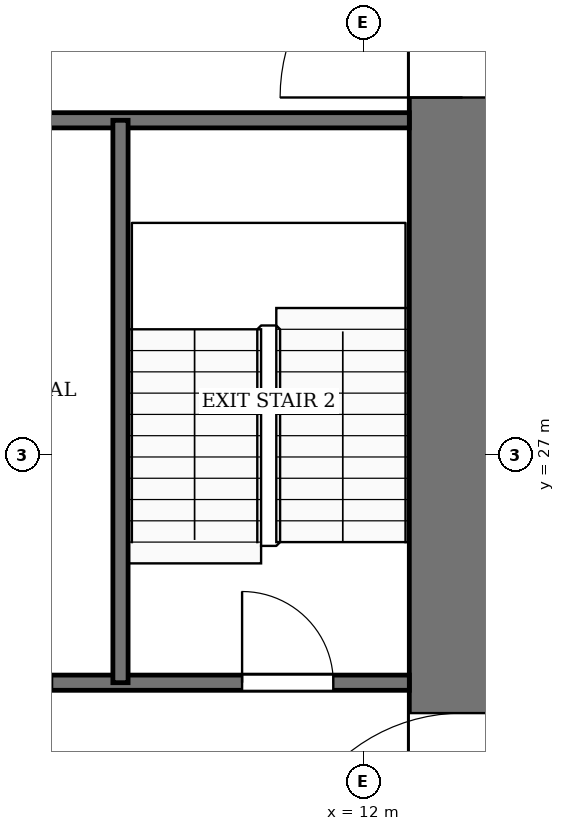
"""IFC4 building model, lengths in metres.
Left out: names, types, materials, properties, quantities, classifications, styles, units other than length and angle.
Written with IfcOpenShell. Run it as: python <this file> out.ifc"""

import sys

from ifc_helpers import new_model, si_unit, direction, frame, frame_2d, origin, place, context, subcontext, project, spatial, rectangle, extrude, element, fill, save


model = new_model("IFC4")
c1 = context("Model", 3, precision=1e-05, world=origin(), true_north=direction((0.0, 1.0)))
c2 = subcontext(c1, "Body", "Model", "MODEL_VIEW")
j1 = project(units=[si_unit("LENGTHUNIT", "METRE"), si_unit("PLANEANGLEUNIT", "RADIAN")], contexts=[c1])
p1 = place(None, origin())
s1 = spatial("IfcSite", under=j1, at=p1, CompositionType="ELEMENT")
p2 = place(p1, origin())
s2 = spatial("IfcBuilding", under=s1, at=p2, CompositionType="ELEMENT")
p3 = place(p2, frame((0.0, 0.0, 18.0)))
s3 = spatial("IfcBuildingStorey", under=s2, at=p3, CompositionType="ELEMENT", Elevation=18.0)
p4 = place(p3, frame((13.3, 18.4, -0.13), z_axis=(0.0, 0.0, 1.0), x_axis=(0.0, 1.0, 0.0)))
e1 = element("IfcWall", 1, at=p4, inside=s3, PredefinedType="SHEAR", context=c2, shape_type="SweptSolid", body=[
    extrude(rectangle(XDim=19.2, YDim=1.4, at=frame_2d((9.6, 0.0))), origin(), (0.0, 0.0, 1.0), 4.0),
])
p5 = place(p4, frame((2.8, 0.0, 0.13)))
e2 = element("IfcOpeningElement", 2, at=p5, cuts=e1, PredefinedType="OPENING", context=c2, shape_type="SweptSolid", body=[
    extrude(rectangle(XDim=2.4, YDim=2.4, at=frame_2d((1.2, 1.2))), frame((0.0, 0.71, 0.0), z_axis=(0.0, -1.0, 0.0), x_axis=(1.0, 0.0, 0.0)), (0.0, 0.0, 1.0), 1.42),
])
p6 = place(p4, frame((13.3, 0.0, 0.13)))
e3 = element("IfcOpeningElement", 3, at=p6, cuts=e1, PredefinedType="OPENING", context=c2, shape_type="SweptSolid", body=[
    extrude(rectangle(XDim=2.4, YDim=2.4, at=frame_2d((1.2, 1.2))), frame((0.0, 0.71, 0.0), z_axis=(0.0, -1.0, 0.0), x_axis=(1.0, 0.0, 0.0)), (0.0, 0.0, 1.0), 1.42),
])
p7 = place(p3, frame((6.0, 24.0, 0.0), z_axis=(0.0, 0.0, 1.0), x_axis=(1.0, 0.0, 0.0)))
e4 = element("IfcWall", 4, at=p7, inside=s3, PredefinedType="PARTITIONING", context=c2, shape_type="SweptSolid", body=[
    extrude(rectangle(XDim=6.6, YDim=0.2, at=frame_2d((3.3, 0.0))), origin(), (0.0, 0.0, 1.0), 3.87),
])
p8 = place(p7, frame((0.9, 0.0, 0.0)))
e5 = element("IfcOpeningElement", 5, at=p8, cuts=e4, PredefinedType="OPENING", context=c2, shape_type="SweptSolid", body=[
    extrude(rectangle(XDim=1.0, YDim=2.1, at=frame_2d((0.5, 1.05))), frame((0.0, 0.11, 0.0), z_axis=(0.0, -1.0, 0.0), x_axis=(1.0, 0.0, 0.0)), (0.0, 0.0, 1.0), 0.22),
])
p9 = place(p7, frame((4.4, 0.0, 0.0)))
e6 = element("IfcOpeningElement", 6, at=p9, cuts=e4, PredefinedType="OPENING", context=c2, shape_type="SweptSolid", body=[
    extrude(rectangle(XDim=1.2, YDim=2.2, at=frame_2d((0.6, 1.1))), frame((0.0, 0.11, 0.0), z_axis=(0.0, -1.0, 0.0), x_axis=(1.0, 0.0, 0.0)), (0.0, 0.0, 1.0), 0.22),
])
p10 = place(p3, frame((6.0, 31.4, 0.0), z_axis=(0.0, 0.0, 1.0), x_axis=(1.0, 0.0, 0.0)))
e7 = element("IfcWall", 7, at=p10, inside=s3, PredefinedType="PARTITIONING", context=c2, shape_type="SweptSolid", body=[
    extrude(rectangle(XDim=6.6, YDim=0.2, at=frame_2d((3.3, 0.0))), origin(), (0.0, 0.0, 1.0), 3.87),
])
p11 = place(p3, frame((8.8, 24.0, 0.0), z_axis=(0.0, 0.0, 1.0), x_axis=(0.0, 1.0, 0.0)))
e8 = element("IfcWall", 8, at=p11, inside=s3, PredefinedType="PARTITIONING", context=c2, shape_type="SweptSolid", body=[
    extrude(rectangle(XDim=7.4, YDim=0.2, at=frame_2d((3.7, 0.0))), origin(), (0.0, 0.0, 1.0), 3.87),
])
p12 = place(p9, origin())
e9 = element("IfcDoor", 9, at=p12, inside=s3, OperationType="SINGLE_SWING_LEFT", PredefinedType="DOOR", context=c2, shape_type="SweptSolid", body=[
    extrude(rectangle(XDim=1.2, YDim=2.2, at=frame_2d((0.6, 1.1))), frame((0.0, 0.025, 0.0), z_axis=(0.0, -1.0, 0.0), x_axis=(1.0, 0.0, 0.0)), (0.0, 0.0, 1.0), 0.05),
])
fill(e6, e9)
p13 = place(p5, origin())
e10 = element("IfcDoor", 10, at=p13, inside=s3, OperationType="DOUBLE_DOOR_SINGLE_SWING", PredefinedType="DOOR", context=c2, shape_type="SweptSolid", body=[
    extrude(rectangle(XDim=2.4, YDim=2.4, at=frame_2d((1.2, 1.2))), frame((0.0, 0.025, 0.0), z_axis=(0.0, -1.0, 0.0), x_axis=(1.0, 0.0, 0.0)), (0.0, 0.0, 1.0), 0.05),
])
fill(e2, e10)
p14 = place(p6, origin())
e11 = element("IfcDoor", 11, at=p14, inside=s3, OperationType="DOUBLE_DOOR_SINGLE_SWING", PredefinedType="DOOR", context=c2, shape_type="SweptSolid", body=[
    extrude(rectangle(XDim=2.4, YDim=2.4, at=frame_2d((1.2, 1.2))), frame((0.0, 0.025, 0.0), z_axis=(0.0, -1.0, 0.0), x_axis=(1.0, 0.0, 0.0)), (0.0, 0.0, 1.0), 0.05),
])
fill(e3, e11)
save(model, sys.argv[1])
